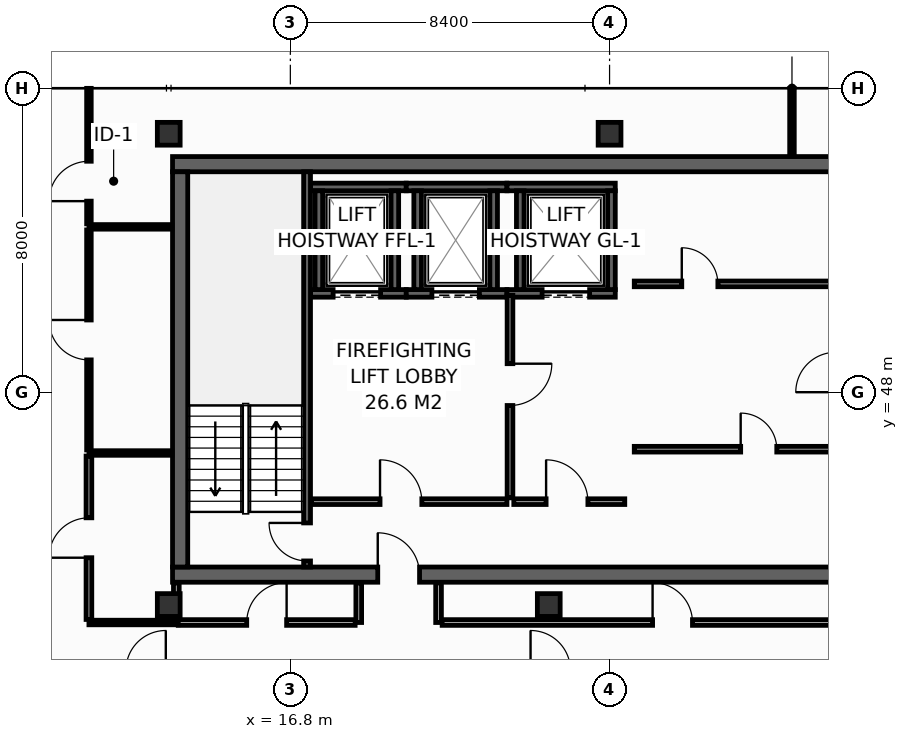
"""IFC4 building model, lengths in metres.
Left out: names, types, materials, properties, quantities, classifications, styles, units other than length and angle.
Written with IfcOpenShell. Run it as: python <this file> out.ifc"""

import sys

from ifc_helpers import new_model, si_unit, direction, frame, frame_2d, origin, origin_2d, place, context, subcontext, project, spatial, rectangle, hollow_rectangle, extrude, element, fill, save


model = new_model("IFC4")
c1 = context("Model", 3, precision=1e-05, world=origin(), true_north=direction((0.0, 1.0)))
c2 = subcontext(c1, "Body", "Model", "MODEL_VIEW")
j1 = project(units=[si_unit("LENGTHUNIT", "METRE"), si_unit("PLANEANGLEUNIT", "RADIAN")], contexts=[c1])
p1 = place(None, origin())
s1 = spatial("IfcSite", under=j1, at=p1, CompositionType="ELEMENT")
p2 = place(p1, origin())
s2 = spatial("IfcBuilding", under=s1, at=p2, CompositionType="ELEMENT")
p3 = place(p2, frame((0.0, 0.0, 295.2)))
s3 = spatial("IfcBuildingStorey", under=s2, at=p3, CompositionType="ELEMENT", Elevation=295.2)
p4 = place(p3, frame((13.7, 43.2, 0.0), z_axis=(0.0, 0.0, 1.0), x_axis=(1.0, 0.0, 0.0)))
e1 = element("IfcWall", 1, at=p4, inside=s3, PredefinedType="SHEAR", context=c2, shape_type="SweptSolid", body=[
    extrude(rectangle(XDim=32.5, YDim=0.4, at=frame_2d((16.25, 0.0))), origin(), (0.0, 0.0, 1.0), 3.55),
])
p5 = place(p4, frame((5.4, 0.0, 0.0)))
e2 = element("IfcOpeningElement", 2, at=p5, cuts=e1, PredefinedType="OPENING", context=c2, shape_type="SweptSolid", body=[
    extrude(rectangle(XDim=1.1, YDim=2.15, at=frame_2d((0.55, 1.075))), frame((0.0, 0.21, 0.0), z_axis=(0.0, -1.0, 0.0), x_axis=(1.0, 0.0, 0.0)), (0.0, 0.0, 1.0), 0.42),
])
p6 = place(p4, frame((25.6, 0.0, 0.0)))
e3 = element("IfcOpeningElement", 3, at=p6, cuts=e1, PredefinedType="OPENING", context=c2, shape_type="SweptSolid", body=[
    extrude(rectangle(XDim=1.1, YDim=2.15, at=frame_2d((0.55, 1.075))), frame((0.0, 0.21, 0.0), z_axis=(0.0, -1.0, 0.0), x_axis=(1.0, 0.0, 0.0)), (0.0, 0.0, 1.0), 0.42),
])
p7 = place(p3, frame((13.7, 54.0, 0.0), z_axis=(0.0, 0.0, 1.0), x_axis=(1.0, 0.0, 0.0)))
e4 = element("IfcWall", 4, at=p7, inside=s3, PredefinedType="SHEAR", context=c2, shape_type="SweptSolid", body=[
    extrude(rectangle(XDim=32.5, YDim=0.4, at=frame_2d((16.25, 0.0))), origin(), (0.0, 0.0, 1.0), 3.55),
])
p8 = place(p3, frame((13.9, 43.4, 0.0), z_axis=(0.0, 0.0, 1.0), x_axis=(0.0, 1.0, 0.0)))
e5 = element("IfcWall", 5, at=p8, inside=s3, PredefinedType="SHEAR", context=c2, shape_type="SweptSolid", body=[
    extrude(rectangle(XDim=10.4, YDim=0.4, at=frame_2d((5.2, 0.0))), origin(), (0.0, 0.0, 1.0), 3.55),
])
for number, where, z_axis, x_axis in (
    (6, (13.6, 54.8, 0.0), (0.0, 0.0, 1.0), (1.0, 0.0, 0.0)),
    (7, (25.2, 54.8, 0.0), (0.0, 0.0, 1.0), (1.0, 0.0, 0.0)),
    (8, (13.6, 42.4, 0.0), (0.0, 0.0, 1.0), (1.0, 0.0, 0.0)),
    (9, (23.6, 42.4, 0.0), (0.0, 0.0, 1.0), (1.0, 0.0, 0.0)),
):
    element("IfcColumn", number, at=place(p3, frame(where, z_axis=z_axis, x_axis=x_axis)), inside=s3, PredefinedType="COLUMN", context=c2, shape_type="SweptSolid", body=[
        extrude(hollow_rectangle(XDim=0.6, YDim=0.6, WallThickness=0.028, at=origin_2d()), origin(), (0.0, 0.0, 1.0), 3.8),
    ])
p9 = place(p3, frame((17.33, 50.6, 0.0), z_axis=(0.0, 0.0, 1.0), x_axis=(1.0, 0.0, 0.0)))
e10 = element("IfcWall", 10, at=p9, inside=s3, PredefinedType="SHEAR", context=c2, shape_type="SweptSolid", body=[
    extrude(rectangle(XDim=2.52, YDim=0.2, at=frame_2d((1.26, 0.0))), origin(), (0.0, 0.0, 1.0), 3.55),
])
p10 = place(p9, frame((0.595, 0.0, 0.0)))
e11 = element("IfcOpeningElement", 11, at=p10, cuts=e10, PredefinedType="OPENING", context=c2, shape_type="SweptSolid", body=[
    extrude(rectangle(XDim=1.25, YDim=2.3, at=frame_2d((0.625, 1.15))), frame((0.0, 0.11, 0.0), z_axis=(0.0, -1.0, 0.0), x_axis=(1.0, 0.0, 0.0)), (0.0, 0.0, 1.0), 0.22),
])
p11 = place(p3, frame((17.33, 53.4, 0.0), z_axis=(0.0, 0.0, 1.0), x_axis=(1.0, 0.0, 0.0)))
e12 = element("IfcWall", 12, at=p11, inside=s3, PredefinedType="SHEAR", context=c2, shape_type="SweptSolid", body=[
    extrude(rectangle(XDim=2.52, YDim=0.2, at=frame_2d((1.26, 0.0))), origin(), (0.0, 0.0, 1.0), 3.55),
])
for number, where, z_axis, x_axis in (
    (13, (17.55, 50.7, 0.0), (0.0, 0.0, 1.0), (0.0, 1.0, 0.0)),
    (14, (19.55, 50.7, 0.0), (0.0, 0.0, 1.0), (0.0, 1.0, 0.0)),
):
    element("IfcWall", number, at=place(p3, frame(where, z_axis=z_axis, x_axis=x_axis)), inside=s3, PredefinedType="SHEAR", context=c2, shape_type="SweptSolid", body=[
        extrude(rectangle(XDim=2.6, YDim=0.2, at=frame_2d((1.3, 0.0))), origin(), (0.0, 0.0, 1.0), 3.55),
    ])
p12 = place(p3, frame((19.85, 50.6, 0.0), z_axis=(0.0, 0.0, 1.0), x_axis=(1.0, 0.0, 0.0)))
e15 = element("IfcWall", 15, at=p12, inside=s3, PredefinedType="SHEAR", context=c2, shape_type="SweptSolid", body=[
    extrude(rectangle(XDim=2.65, YDim=0.2, at=frame_2d((1.325, 0.0))), origin(), (0.0, 0.0, 1.0), 3.55),
])
p13 = place(p12, frame((0.675, 0.0, 0.0)))
e16 = element("IfcOpeningElement", 16, at=p13, cuts=e15, PredefinedType="OPENING", context=c2, shape_type="SweptSolid", body=[
    extrude(rectangle(XDim=1.25, YDim=2.3, at=frame_2d((0.625, 1.15))), frame((0.0, 0.11, 0.0), z_axis=(0.0, -1.0, 0.0), x_axis=(1.0, 0.0, 0.0)), (0.0, 0.0, 1.0), 0.22),
])
p14 = place(p3, frame((19.85, 53.4, 0.0), z_axis=(0.0, 0.0, 1.0), x_axis=(1.0, 0.0, 0.0)))
e17 = element("IfcWall", 17, at=p14, inside=s3, PredefinedType="SHEAR", context=c2, shape_type="SweptSolid", body=[
    extrude(rectangle(XDim=2.65, YDim=0.2, at=frame_2d((1.325, 0.0))), origin(), (0.0, 0.0, 1.0), 3.55),
])
for number, where, z_axis, x_axis in (
    (18, (20.15, 50.7, 0.0), (0.0, 0.0, 1.0), (0.0, 1.0, 0.0)),
    (19, (22.15, 50.7, 0.0), (0.0, 0.0, 1.0), (0.0, 1.0, 0.0)),
):
    element("IfcWall", number, at=place(p3, frame(where, z_axis=z_axis, x_axis=x_axis)), inside=s3, PredefinedType="SHEAR", context=c2, shape_type="SweptSolid", body=[
        extrude(rectangle(XDim=2.6, YDim=0.2, at=frame_2d((1.3, 0.0))), origin(), (0.0, 0.0, 1.0), 3.55),
    ])
p15 = place(p3, frame((22.5, 50.6, 0.0), z_axis=(0.0, 0.0, 1.0), x_axis=(1.0, 0.0, 0.0)))
e20 = element("IfcWall", 20, at=p15, inside=s3, PredefinedType="SHEAR", context=c2, shape_type="SweptSolid", body=[
    extrude(rectangle(XDim=2.85, YDim=0.2, at=frame_2d((1.425, 0.0))), origin(), (0.0, 0.0, 1.0), 3.55),
])
p16 = place(p15, frame((0.925, 0.0, 0.0)))
e21 = element("IfcOpeningElement", 21, at=p16, cuts=e20, PredefinedType="OPENING", context=c2, shape_type="SweptSolid", body=[
    extrude(rectangle(XDim=1.25, YDim=2.3, at=frame_2d((0.625, 1.15))), frame((0.0, 0.11, 0.0), z_axis=(0.0, -1.0, 0.0), x_axis=(1.0, 0.0, 0.0)), (0.0, 0.0, 1.0), 0.22),
])
p17 = place(p3, frame((22.5, 53.4, 0.0), z_axis=(0.0, 0.0, 1.0), x_axis=(1.0, 0.0, 0.0)))
e22 = element("IfcWall", 22, at=p17, inside=s3, PredefinedType="SHEAR", context=c2, shape_type="SweptSolid", body=[
    extrude(rectangle(XDim=2.85, YDim=0.2, at=frame_2d((1.425, 0.0))), origin(), (0.0, 0.0, 1.0), 3.55),
])
for number, where, z_axis, x_axis in (
    (23, (22.85, 50.7, 0.0), (0.0, 0.0, 1.0), (0.0, 1.0, 0.0)),
    (24, (25.25, 50.7, 0.0), (0.0, 0.0, 1.0), (0.0, 1.0, 0.0)),
):
    element("IfcWall", number, at=place(p3, frame(where, z_axis=z_axis, x_axis=x_axis)), inside=s3, PredefinedType="SHEAR", context=c2, shape_type="SweptSolid", body=[
        extrude(rectangle(XDim=2.6, YDim=0.2, at=frame_2d((1.3, 0.0))), origin(), (0.0, 0.0, 1.0), 3.55),
    ])
p18 = place(p3, frame((17.24, 43.4, 0.0), z_axis=(0.0, 0.0, 1.0), x_axis=(0.0, 1.0, 0.0)))
e25 = element("IfcWall", 25, at=p18, inside=s3, PredefinedType="SHEAR", context=c2, shape_type="SweptSolid", body=[
    extrude(rectangle(XDim=10.4, YDim=0.18, at=frame_2d((5.2, 0.0))), origin(), (0.0, 0.0, 1.0), 3.55),
])
p19 = place(p18, frame((0.16, 0.0, 0.0)))
e26 = element("IfcOpeningElement", 26, at=p19, cuts=e25, PredefinedType="OPENING", context=c2, shape_type="SweptSolid", body=[
    extrude(rectangle(XDim=1.0, YDim=2.15, at=frame_2d((0.5, 1.075))), frame((0.0, 0.1, 0.0), z_axis=(0.0, -1.0, 0.0), x_axis=(1.0, 0.0, 0.0)), (0.0, 0.0, 1.0), 0.2),
])
p20 = place(p3, frame((17.36, 45.12, 0.0), z_axis=(0.0, 0.0, 1.0), x_axis=(1.0, 0.0, 0.0)))
e27 = element("IfcWall", 27, at=p20, inside=s3, PredefinedType="PARTITIONING", context=c2, shape_type="SweptSolid", body=[
    extrude(rectangle(XDim=5.14, YDim=0.15, at=frame_2d((2.57, 0.0))), origin(), (0.0, 0.0, 1.0), 3.55),
])
p21 = place(p20, frame((1.8, 0.0, 0.0)))
e28 = element("IfcOpeningElement", 28, at=p21, cuts=e27, PredefinedType="OPENING", context=c2, shape_type="SweptSolid", body=[
    extrude(rectangle(XDim=1.1, YDim=2.15, at=frame_2d((0.55, 1.075))), frame((0.0, 0.085, 0.0), z_axis=(0.0, -1.0, 0.0), x_axis=(1.0, 0.0, 0.0)), (0.0, 0.0, 1.0), 0.17),
])
p22 = place(p3, frame((22.58, 50.55, 0.0), z_axis=(0.0, 0.0, 1.0), x_axis=(0.0, -1.0, 0.0)))
e29 = element("IfcWall", 29, at=p22, inside=s3, PredefinedType="PARTITIONING", context=c2, shape_type="SweptSolid", body=[
    extrude(rectangle(XDim=5.33, YDim=0.15, at=frame_2d((2.665, 0.0))), origin(), (0.0, 0.0, 1.0), 3.55),
])
p23 = place(p22, frame((1.8, 0.0, 0.0)))
e30 = element("IfcOpeningElement", 30, at=p23, cuts=e29, PredefinedType="OPENING", context=c2, shape_type="SweptSolid", body=[
    extrude(rectangle(XDim=1.1, YDim=2.15, at=frame_2d((0.55, 1.075))), frame((0.0, 0.085, 0.0), z_axis=(0.0, -1.0, 0.0), x_axis=(1.0, 0.0, 0.0)), (0.0, 0.0, 1.0), 0.17),
])
p24 = place(p3, frame((22.68, 45.12, 0.0), z_axis=(0.0, 0.0, 1.0), x_axis=(1.0, 0.0, 0.0)))
e31 = element("IfcWall", 31, at=p24, inside=s3, PredefinedType="PARTITIONING", context=c2, shape_type="SweptSolid", body=[
    extrude(rectangle(XDim=2.92, YDim=0.15, at=frame_2d((1.46, 0.0))), origin(), (0.0, 0.0, 1.0), 3.55),
])
p25 = place(p24, frame((0.85, 0.0, 0.0)))
e32 = element("IfcOpeningElement", 32, at=p25, cuts=e31, PredefinedType="OPENING", context=c2, shape_type="SweptSolid", body=[
    extrude(rectangle(XDim=1.1, YDim=2.15, at=frame_2d((0.55, 1.075))), frame((0.0, 0.085, 0.0), z_axis=(0.0, -1.0, 0.0), x_axis=(1.0, 0.0, 0.0)), (0.0, 0.0, 1.0), 0.17),
])
p26 = place(p3, frame((25.85, 50.85, 0.0), z_axis=(0.0, 0.0, 1.0), x_axis=(1.0, 0.0, 0.0)))
e33 = element("IfcWall", 33, at=p26, inside=s3, PredefinedType="PARTITIONING", context=c2, shape_type="SweptSolid", body=[
    extrude(rectangle(XDim=7.65, YDim=0.15, at=frame_2d((3.825, 0.0))), origin(), (0.0, 0.0, 1.0), 3.55),
])
p27 = place(p26, frame((1.25, 0.0, 0.0)))
e34 = element("IfcOpeningElement", 34, at=p27, cuts=e33, PredefinedType="OPENING", context=c2, shape_type="SweptSolid", body=[
    extrude(rectangle(XDim=0.95, YDim=2.15, at=frame_2d((0.475, 1.075))), frame((0.0, 0.085, 0.0), z_axis=(0.0, -1.0, 0.0), x_axis=(1.0, 0.0, 0.0)), (0.0, 0.0, 1.0), 0.17),
])
p28 = place(p3, frame((25.85, 46.5, 0.0), z_axis=(0.0, 0.0, 1.0), x_axis=(1.0, 0.0, 0.0)))
e35 = element("IfcWall", 35, at=p28, inside=s3, PredefinedType="PARTITIONING", context=c2, shape_type="SweptSolid", body=[
    extrude(rectangle(XDim=7.65, YDim=0.15, at=frame_2d((3.825, 0.0))), origin(), (0.0, 0.0, 1.0), 3.55),
])
p29 = place(p28, frame((2.8, 0.0, 0.0)))
e36 = element("IfcOpeningElement", 36, at=p29, cuts=e35, PredefinedType="OPENING", context=c2, shape_type="SweptSolid", body=[
    extrude(rectangle(XDim=0.95, YDim=2.15, at=frame_2d((0.475, 1.075))), frame((0.0, 0.085, 0.0), z_axis=(0.0, -1.0, 0.0), x_axis=(1.0, 0.0, 0.0)), (0.0, 0.0, 1.0), 0.17),
])
p30 = place(p3, frame((11.5, 41.94, 0.0), z_axis=(0.0, 0.0, 1.0), x_axis=(1.0, 0.0, 0.0)))
e37 = element("IfcWall", 37, at=p30, inside=s3, PredefinedType="PARTITIONING", context=c2, shape_type="SweptSolid", body=[
    extrude(rectangle(XDim=2.35, YDim=0.12, at=frame_2d((1.175, 0.0))), origin(), (0.0, 0.0, 1.0), 3.55),
])
p31 = place(p3, frame((11.5, 52.35, 0.0), z_axis=(0.0, 0.0, 1.0), x_axis=(1.0, 0.0, 0.0)))
e38 = element("IfcWall", 38, at=p31, inside=s3, PredefinedType="PARTITIONING", context=c2, shape_type="SweptSolid", body=[
    extrude(rectangle(XDim=2.18, YDim=0.12, at=frame_2d((1.09, 0.0))), origin(), (0.0, 0.0, 1.0), 3.55),
])
p32 = place(p3, frame((30.0, 54.22, 0.0), z_axis=(0.0, 0.0, 1.0), x_axis=(0.0, 1.0, 0.0)))
e39 = element("IfcWall", 39, at=p32, inside=s3, PredefinedType="PARTITIONING", context=c2, shape_type="SweptSolid", body=[
    extrude(rectangle(XDim=1.775, YDim=0.12, at=frame_2d((0.888, 0.0))), origin(), (0.0, 0.0, 1.0), 2.935),
])
p33 = place(p3, frame((11.5, 52.43, 0.0), z_axis=(0.0, 0.0, 1.0), x_axis=(0.0, 1.0, 0.0)))
e40 = element("IfcWall", 40, at=p33, inside=s3, PredefinedType="PARTITIONING", context=c2, shape_type="SweptSolid", body=[
    extrude(rectangle(XDim=3.565, YDim=0.12, at=frame_2d((1.783, 0.0))), origin(), (0.0, 0.0, 1.0), 2.935),
])
p34 = place(p33, frame((0.597, 0.0, 0.0)))
e41 = element("IfcOpeningElement", 41, at=p34, cuts=e40, PredefinedType="OPENING", context=c2, shape_type="SweptSolid", body=[
    extrude(rectangle(XDim=1.05, YDim=2.15, at=frame_2d((0.525, 1.075))), frame((0.0, 0.07, 0.0), z_axis=(0.0, -1.0, 0.0), x_axis=(1.0, 0.0, 0.0)), (0.0, 0.0, 1.0), 0.14),
])
p35 = place(p3, frame((11.5, 46.4, 0.0), z_axis=(0.0, 0.0, 1.0), x_axis=(1.0, 0.0, 0.0)))
e42 = element("IfcWall", 42, at=p35, inside=s3, PredefinedType="PARTITIONING", context=c2, shape_type="SweptSolid", body=[
    extrude(rectangle(XDim=2.18, YDim=0.12, at=frame_2d((1.09, 0.0))), origin(), (0.0, 0.0, 1.0), 3.55),
])
p36 = place(p3, frame((11.5, 42.02, 0.0), z_axis=(0.0, 0.0, 1.0), x_axis=(0.0, 1.0, 0.0)))
e43 = element("IfcWall", 43, at=p36, inside=s3, PredefinedType="PARTITIONING", context=c2, shape_type="SweptSolid", body=[
    extrude(rectangle(XDim=4.3, YDim=0.15, at=frame_2d((2.15, 0.0))), origin(), (0.0, 0.0, 1.0), 2.947),
])
p37 = place(p36, frame((1.625, 0.0, 0.0)))
e44 = element("IfcOpeningElement", 44, at=p37, cuts=e43, PredefinedType="OPENING", context=c2, shape_type="SweptSolid", body=[
    extrude(rectangle(XDim=1.05, YDim=2.15, at=frame_2d((0.525, 1.075))), frame((0.0, 0.085, 0.0), z_axis=(0.0, -1.0, 0.0), x_axis=(1.0, 0.0, 0.0)), (0.0, 0.0, 1.0), 0.17),
])
p38 = place(p3, frame((11.5, 46.48, 0.0), z_axis=(0.0, 0.0, 1.0), x_axis=(0.0, 1.0, 0.0)))
e45 = element("IfcWall", 45, at=p38, inside=s3, PredefinedType="PARTITIONING", context=c2, shape_type="SweptSolid", body=[
    extrude(rectangle(XDim=5.79, YDim=0.12, at=frame_2d((2.895, 0.0))), origin(), (0.0, 0.0, 1.0), 3.55),
])
p39 = place(p38, frame((2.37, 0.0, 0.0)))
e46 = element("IfcOpeningElement", 46, at=p39, cuts=e45, PredefinedType="OPENING", context=c2, shape_type="SweptSolid", body=[
    extrude(rectangle(XDim=1.05, YDim=2.15, at=frame_2d((0.525, 1.075))), frame((0.0, 0.07, 0.0), z_axis=(0.0, -1.0, 0.0), x_axis=(1.0, 0.0, 0.0)), (0.0, 0.0, 1.0), 0.14),
])
p40 = place(p3, frame((13.8, 42.02, 0.0), z_axis=(0.0, 0.0, 1.0), x_axis=(0.0, 1.0, 0.0)))
e47 = element("IfcWall", 47, at=p40, inside=s3, PredefinedType="PARTITIONING", context=c2, shape_type="SweptSolid", body=[
    extrude(rectangle(XDim=0.96, YDim=0.15, at=frame_2d((0.48, 0.0))), origin(), (0.0, 0.0, 1.0), 3.55),
])
for number, where, z_axis, x_axis in (
    (48, (18.6, 41.94, 0.0), (0.0, 0.0, 1.0), (0.0, 1.0, 0.0)),
    (49, (20.7, 41.94, 0.0), (0.0, 0.0, 1.0), (0.0, 1.0, 0.0)),
):
    element("IfcWall", number, at=place(p3, frame(where, z_axis=z_axis, x_axis=x_axis)), inside=s3, PredefinedType="PARTITIONING", context=c2, shape_type="SweptSolid", body=[
        extrude(rectangle(XDim=1.04, YDim=0.15, at=frame_2d((0.52, 0.0))), origin(), (0.0, 0.0, 1.0), 3.55),
    ])
p41 = place(p3, frame((13.85, 41.94, 0.0), z_axis=(0.0, 0.0, 1.0), x_axis=(1.0, 0.0, 0.0)))
e50 = element("IfcWall", 50, at=p41, inside=s3, PredefinedType="PARTITIONING", context=c2, shape_type="SweptSolid", body=[
    extrude(rectangle(XDim=4.655, YDim=0.15, at=frame_2d((2.327, 0.0))), origin(), (0.0, 0.0, 1.0), 3.55),
])
p42 = place(p41, frame((1.802, 0.0, 0.0)))
e51 = element("IfcOpeningElement", 51, at=p42, cuts=e50, PredefinedType="OPENING", context=c2, shape_type="SweptSolid", body=[
    extrude(rectangle(XDim=1.05, YDim=2.15, at=frame_2d((0.525, 1.075))), frame((0.0, 0.085, 0.0), z_axis=(0.0, -1.0, 0.0), x_axis=(1.0, 0.0, 0.0)), (0.0, 0.0, 1.0), 0.17),
])
p43 = place(p3, frame((20.795, 41.94, 0.0), z_axis=(0.0, 0.0, 1.0), x_axis=(1.0, 0.0, 0.0)))
e52 = element("IfcWall", 52, at=p43, inside=s3, PredefinedType="PARTITIONING", context=c2, shape_type="SweptSolid", body=[
    extrude(rectangle(XDim=12.125, YDim=0.15, at=frame_2d((6.062, 0.0))), origin(), (0.0, 0.0, 1.0), 3.047),
])
p44 = place(p43, frame((5.537, 0.0, 0.0)))
e53 = element("IfcOpeningElement", 53, at=p44, cuts=e52, PredefinedType="OPENING", context=c2, shape_type="SweptSolid", body=[
    extrude(rectangle(XDim=1.05, YDim=2.15, at=frame_2d((0.525, 1.075))), frame((0.0, 0.085, 0.0), z_axis=(0.0, -1.0, 0.0), x_axis=(1.0, 0.0, 0.0)), (0.0, 0.0, 1.0), 0.17),
])
p45 = place(p10, origin())
e54 = element("IfcDoor", 54, at=p45, inside=s3, OperationType="SLIDING_TO_LEFT", PredefinedType="DOOR", context=c2, shape_type="SweptSolid", body=[
    extrude(rectangle(XDim=1.25, YDim=2.3, at=frame_2d((0.625, 1.15))), frame((0.0, 0.025, 0.0), z_axis=(0.0, -1.0, 0.0), x_axis=(1.0, 0.0, 0.0)), (0.0, 0.0, 1.0), 0.05),
])
fill(e11, e54)
p46 = place(p13, origin())
e55 = element("IfcDoor", 55, at=p46, inside=s3, OperationType="SLIDING_TO_LEFT", PredefinedType="DOOR", context=c2, shape_type="SweptSolid", body=[
    extrude(rectangle(XDim=1.25, YDim=2.3, at=frame_2d((0.625, 1.15))), frame((0.0, 0.025, 0.0), z_axis=(0.0, -1.0, 0.0), x_axis=(1.0, 0.0, 0.0)), (0.0, 0.0, 1.0), 0.05),
])
fill(e16, e55)
p47 = place(p16, origin())
e56 = element("IfcDoor", 56, at=p47, inside=s3, OperationType="SLIDING_TO_LEFT", PredefinedType="DOOR", context=c2, shape_type="SweptSolid", body=[
    extrude(rectangle(XDim=1.25, YDim=2.3, at=frame_2d((0.625, 1.15))), frame((0.0, 0.025, 0.0), z_axis=(0.0, -1.0, 0.0), x_axis=(1.0, 0.0, 0.0)), (0.0, 0.0, 1.0), 0.05),
])
fill(e21, e56)
p48 = place(p19, origin())
e57 = element("IfcDoor", 57, at=p48, inside=s3, OperationType="SINGLE_SWING_RIGHT", PredefinedType="DOOR", context=c2, shape_type="SweptSolid", body=[
    extrude(rectangle(XDim=1.0, YDim=2.15, at=frame_2d((0.5, 1.075))), frame((0.0, 0.025, 0.0), z_axis=(0.0, -1.0, 0.0), x_axis=(1.0, 0.0, 0.0)), (0.0, 0.0, 1.0), 0.05),
])
fill(e26, e57)
p49 = place(p21, origin())
e58 = element("IfcDoor", 58, at=p49, inside=s3, OperationType="SINGLE_SWING_LEFT", PredefinedType="DOOR", context=c2, shape_type="SweptSolid", body=[
    extrude(rectangle(XDim=1.1, YDim=2.15, at=frame_2d((0.55, 1.075))), frame((0.0, 0.025, 0.0), z_axis=(0.0, -1.0, 0.0), x_axis=(1.0, 0.0, 0.0)), (0.0, 0.0, 1.0), 0.05),
])
fill(e28, e58)
p50 = place(p23, origin())
e59 = element("IfcDoor", 59, at=p50, inside=s3, OperationType="SINGLE_SWING_LEFT", PredefinedType="DOOR", context=c2, shape_type="SweptSolid", body=[
    extrude(rectangle(XDim=1.1, YDim=2.15, at=frame_2d((0.55, 1.075))), frame((0.0, 0.025, 0.0), z_axis=(0.0, -1.0, 0.0), x_axis=(1.0, 0.0, 0.0)), (0.0, 0.0, 1.0), 0.05),
])
fill(e30, e59)
p51 = place(p25, origin())
e60 = element("IfcDoor", 60, at=p51, inside=s3, OperationType="SINGLE_SWING_LEFT", PredefinedType="DOOR", context=c2, shape_type="SweptSolid", body=[
    extrude(rectangle(XDim=1.1, YDim=2.15, at=frame_2d((0.55, 1.075))), frame((0.0, 0.025, 0.0), z_axis=(0.0, -1.0, 0.0), x_axis=(1.0, 0.0, 0.0)), (0.0, 0.0, 1.0), 0.05),
])
fill(e32, e60)
p52 = place(p5, origin())
e61 = element("IfcDoor", 61, at=p52, inside=s3, OperationType="SINGLE_SWING_LEFT", PredefinedType="DOOR", context=c2, shape_type="SweptSolid", body=[
    extrude(rectangle(XDim=1.1, YDim=2.15, at=frame_2d((0.55, 1.075))), frame((0.0, 0.025, 0.0), z_axis=(0.0, -1.0, 0.0), x_axis=(1.0, 0.0, 0.0)), (0.0, 0.0, 1.0), 0.05),
])
fill(e2, e61)
p53 = place(p27, origin())
e62 = element("IfcDoor", 62, at=p53, inside=s3, OperationType="SINGLE_SWING_LEFT", PredefinedType="DOOR", context=c2, shape_type="SweptSolid", body=[
    extrude(rectangle(XDim=0.95, YDim=2.15, at=frame_2d((0.475, 1.075))), frame((0.0, 0.025, 0.0), z_axis=(0.0, -1.0, 0.0), x_axis=(1.0, 0.0, 0.0)), (0.0, 0.0, 1.0), 0.05),
])
fill(e34, e62)
p54 = place(p29, origin())
e63 = element("IfcDoor", 63, at=p54, inside=s3, OperationType="SINGLE_SWING_LEFT", PredefinedType="DOOR", context=c2, shape_type="SweptSolid", body=[
    extrude(rectangle(XDim=0.95, YDim=2.15, at=frame_2d((0.475, 1.075))), frame((0.0, 0.025, 0.0), z_axis=(0.0, -1.0, 0.0), x_axis=(1.0, 0.0, 0.0)), (0.0, 0.0, 1.0), 0.05),
])
fill(e36, e63)
p55 = place(p34, origin())
e64 = element("IfcDoor", 64, at=p55, inside=s3, OperationType="SINGLE_SWING_LEFT", PredefinedType="DOOR", context=c2, shape_type="SweptSolid", body=[
    extrude(rectangle(XDim=1.05, YDim=2.15, at=frame_2d((0.525, 1.075))), frame((0.0, 0.025, 0.0), z_axis=(0.0, -1.0, 0.0), x_axis=(1.0, 0.0, 0.0)), (0.0, 0.0, 1.0), 0.05),
])
fill(e41, e64)
p56 = place(p37, origin())
e65 = element("IfcDoor", 65, at=p56, inside=s3, OperationType="SINGLE_SWING_LEFT", PredefinedType="DOOR", context=c2, shape_type="SweptSolid", body=[
    extrude(rectangle(XDim=1.05, YDim=2.15, at=frame_2d((0.525, 1.075))), frame((0.0, 0.025, 0.0), z_axis=(0.0, -1.0, 0.0), x_axis=(1.0, 0.0, 0.0)), (0.0, 0.0, 1.0), 0.05),
])
fill(e44, e65)
p57 = place(p39, origin())
e66 = element("IfcDoor", 66, at=p57, inside=s3, OperationType="SINGLE_SWING_RIGHT", PredefinedType="DOOR", context=c2, shape_type="SweptSolid", body=[
    extrude(rectangle(XDim=1.05, YDim=2.15, at=frame_2d((0.525, 1.075))), frame((0.0, 0.025, 0.0), z_axis=(0.0, -1.0, 0.0), x_axis=(1.0, 0.0, 0.0)), (0.0, 0.0, 1.0), 0.05),
])
fill(e46, e66)
p58 = place(p42, origin())
e67 = element("IfcDoor", 67, at=p58, inside=s3, OperationType="SINGLE_SWING_RIGHT", PredefinedType="DOOR", context=c2, shape_type="SweptSolid", body=[
    extrude(rectangle(XDim=1.05, YDim=2.15, at=frame_2d((0.525, 1.075))), frame((0.0, 0.025, 0.0), z_axis=(0.0, -1.0, 0.0), x_axis=(1.0, 0.0, 0.0)), (0.0, 0.0, 1.0), 0.05),
])
fill(e51, e67)
p59 = place(p44, origin())
e68 = element("IfcDoor", 68, at=p59, inside=s3, OperationType="SINGLE_SWING_LEFT", PredefinedType="DOOR", context=c2, shape_type="SweptSolid", body=[
    extrude(rectangle(XDim=1.05, YDim=2.15, at=frame_2d((0.525, 1.075))), frame((0.0, 0.025, 0.0), z_axis=(0.0, -1.0, 0.0), x_axis=(1.0, 0.0, 0.0)), (0.0, 0.0, 1.0), 0.05),
])
fill(e53, e68)
save(model, sys.argv[1])
